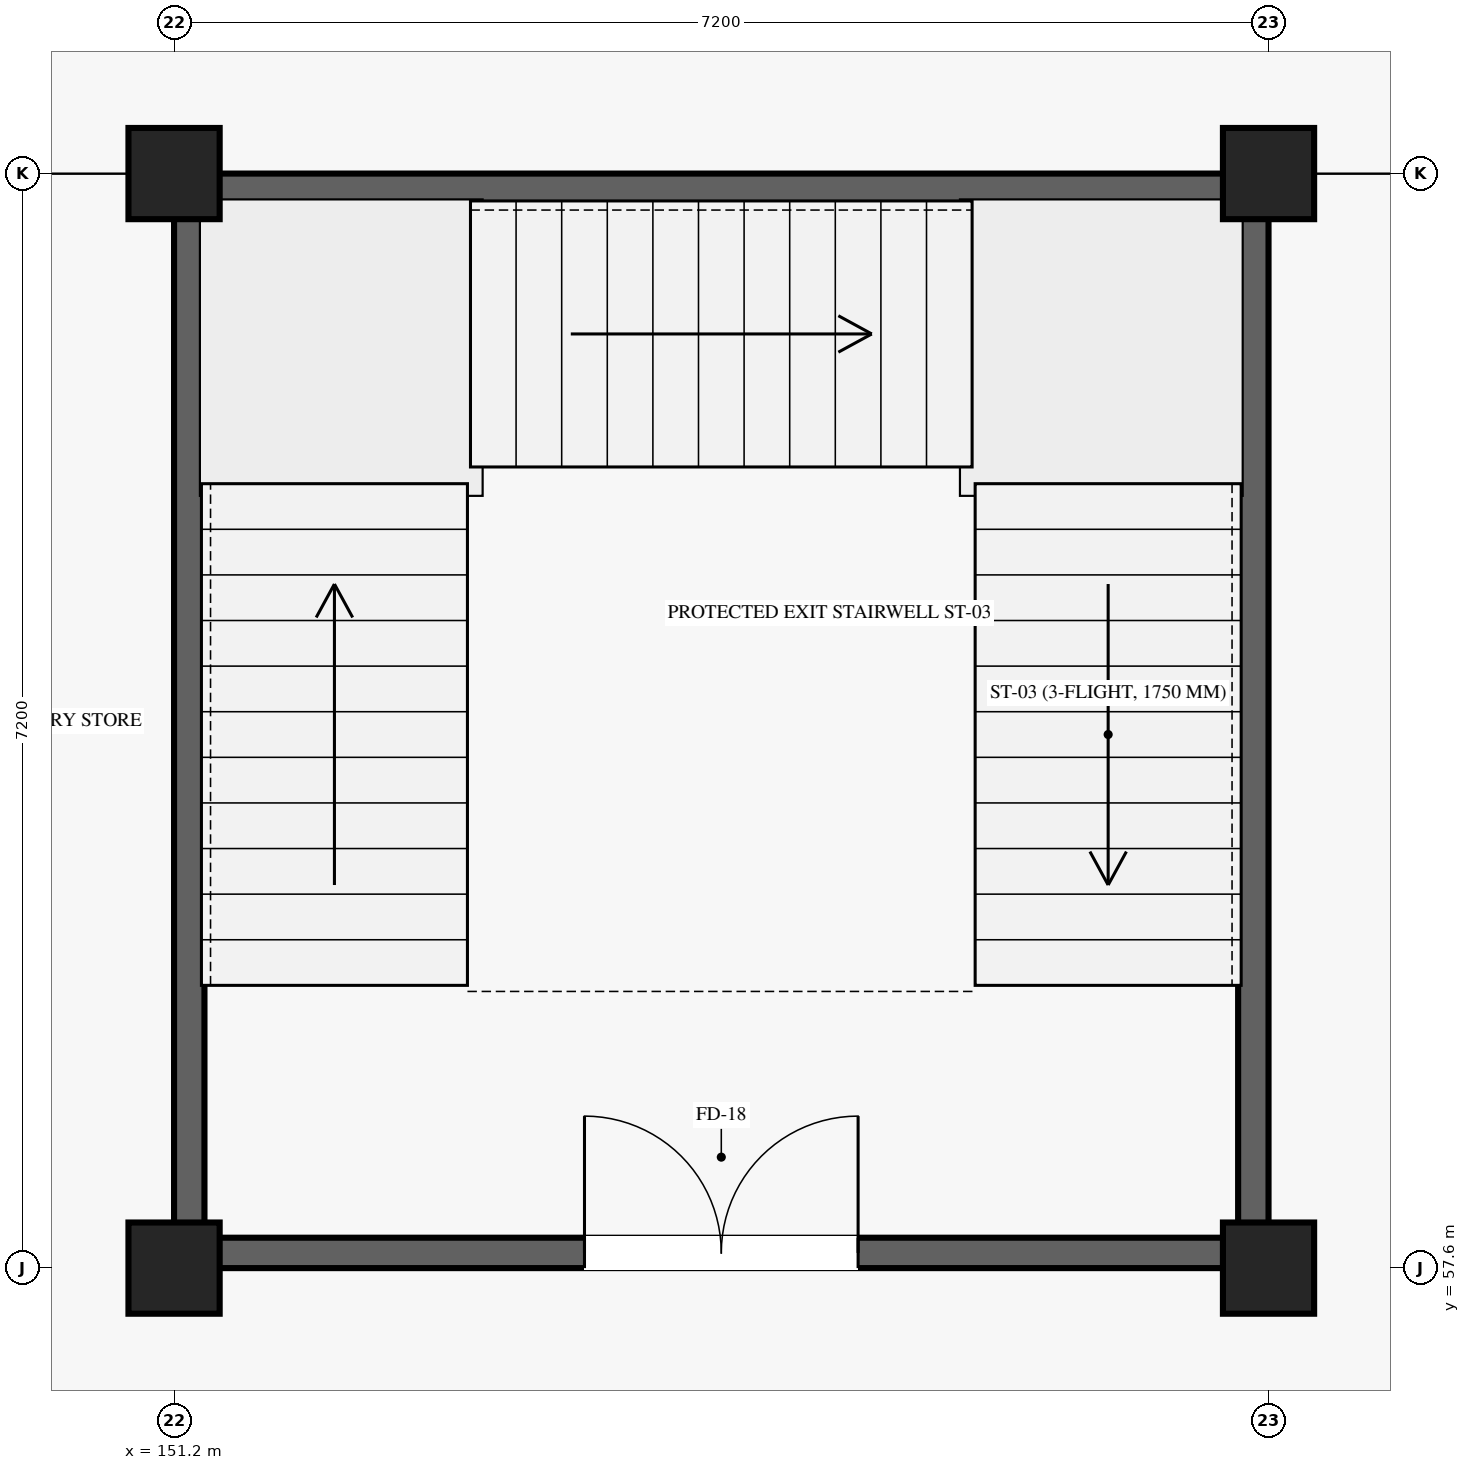
"""IFC4 building model, lengths in metres.
Left out: names, types, materials, properties, quantities, classifications, styles, units other than length and angle.
Written with IfcOpenShell. Run it as: python <this file> out.ifc"""

import sys

from ifc_helpers import new_model, si_unit, direction, frame, frame_2d, origin, origin_2d, place, context, subcontext, project, spatial, rectangle, extrude, element, fill, save


model = new_model("IFC4")
c1 = context("Model", 3, precision=1e-05, world=origin(), true_north=direction((0.0, 1.0)))
c2 = subcontext(c1, "Body", "Model", "MODEL_VIEW")
j1 = project(units=[si_unit("LENGTHUNIT", "METRE"), si_unit("PLANEANGLEUNIT", "RADIAN")], contexts=[c1])
p1 = place(None, origin())
s1 = spatial("IfcSite", under=j1, at=p1, CompositionType="ELEMENT")
p2 = place(p1, origin())
s2 = spatial("IfcBuilding", under=s1, at=p2, CompositionType="ELEMENT")
p3 = place(p2, origin())
s3 = spatial("IfcBuildingStorey", under=s2, at=p3, CompositionType="ELEMENT", Elevation=0.0)
for number, where, z_axis, x_axis in (
    (1, (151.2, 57.6, 0.0), (0.0, 0.0, 1.0), (1.0, 0.0, 0.0)),
    (2, (151.2, 64.8, 0.0), (0.0, 0.0, 1.0), (1.0, 0.0, 0.0)),
    (3, (158.4, 57.6, 0.0), (0.0, 0.0, 1.0), (1.0, 0.0, 0.0)),
    (4, (158.4, 64.8, 0.0), (0.0, 0.0, 1.0), (1.0, 0.0, 0.0)),
):
    element("IfcColumn", number, at=place(p3, frame(where, z_axis=z_axis, x_axis=x_axis)), inside=s3, PredefinedType="COLUMN", context=c2, shape_type="SweptSolid", body=[
        extrude(rectangle(XDim=0.85, YDim=0.85, at=origin_2d()), origin(), (0.0, 0.0, 1.0), 5.4),
    ])
p4 = place(p3, frame((151.4, 57.7, 0.0), z_axis=(0.0, 0.0, 1.0), x_axis=(1.0, 0.0, 0.0)))
e5 = element("IfcWall", 5, at=p4, inside=s3, PredefinedType="SHEAR", context=c2, shape_type="SweptSolid", body=[
    extrude(rectangle(XDim=6.8, YDim=0.2, at=frame_2d((3.4, 0.0))), origin(), (0.0, 0.0, 1.0), 5.16),
])
p5 = place(p4, frame((2.5, 0.0, 0.0)))
e6 = element("IfcOpeningElement", 6, at=p5, cuts=e5, PredefinedType="OPENING", context=c2, shape_type="SweptSolid", body=[
    extrude(rectangle(XDim=1.8, YDim=2.2, at=frame_2d((0.9, 1.1))), frame((0.0, 0.11, 0.0), z_axis=(0.0, -1.0, 0.0), x_axis=(1.0, 0.0, 0.0)), (0.0, 0.0, 1.0), 0.22),
])
for number, where, z_axis, x_axis in (
    (7, (151.4, 64.7, 0.0), (0.0, 0.0, 1.0), (1.0, 0.0, 0.0)),
    (8, (151.3, 57.8, 0.0), (0.0, 0.0, 1.0), (0.0, 1.0, 0.0)),
    (9, (158.3, 57.8, 0.0), (0.0, 0.0, 1.0), (0.0, 1.0, 0.0)),
):
    element("IfcWall", number, at=place(p3, frame(where, z_axis=z_axis, x_axis=x_axis)), inside=s3, PredefinedType="SHEAR", context=c2, shape_type="SweptSolid", body=[
        extrude(rectangle(XDim=6.8, YDim=0.2, at=frame_2d((3.4, 0.0))), origin(), (0.0, 0.0, 1.0), 5.16),
    ])
p6 = place(p5, origin())
e10 = element("IfcDoor", 10, at=p6, inside=s3, OperationType="DOUBLE_DOOR_SINGLE_SWING", PredefinedType="DOOR", context=c2, shape_type="SweptSolid", body=[
    extrude(rectangle(XDim=1.8, YDim=2.2, at=frame_2d((0.9, 1.1))), frame((0.0, 0.025, 0.0), z_axis=(0.0, -1.0, 0.0), x_axis=(1.0, 0.0, 0.0)), (0.0, 0.0, 1.0), 0.05),
])
fill(e6, e10)
save(model, sys.argv[1])
